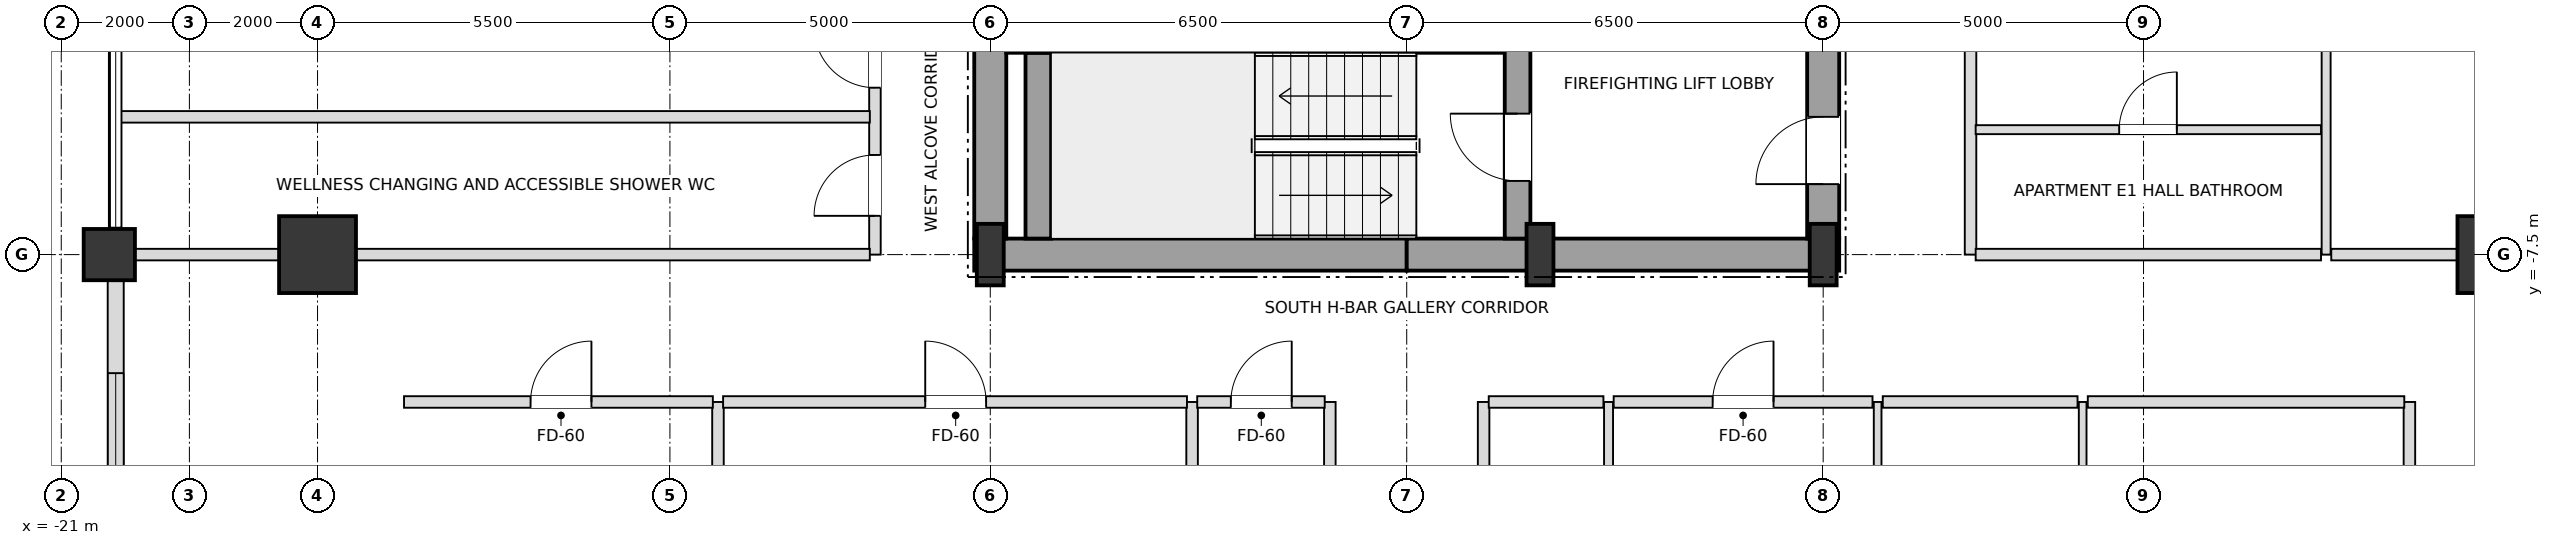
"""IFC4 building model, lengths in metres.
Left out: names, types, materials, properties, quantities, classifications, styles, units other than length and angle.
Written with IfcOpenShell. Run it as: python <this file> out.ifc"""

import sys

from ifc_helpers import new_model, si_unit, direction, frame, frame_2d, origin, origin_2d, place, context, subcontext, project, spatial, rectangle, i_section, extrude, element, fill, save


model = new_model("IFC4")
c1 = context("Model", 3, precision=1e-05, world=origin(), true_north=direction((0.0, 1.0)))
c2 = subcontext(c1, "Body", "Model", "MODEL_VIEW")
j1 = project(units=[si_unit("LENGTHUNIT", "METRE"), si_unit("PLANEANGLEUNIT", "RADIAN")], contexts=[c1])
p1 = place(None, origin())
s1 = spatial("IfcSite", under=j1, at=p1, CompositionType="ELEMENT")
p2 = place(p1, origin())
s2 = spatial("IfcBuilding", under=s1, at=p2, CompositionType="ELEMENT")
p3 = place(p2, frame((0.0, 0.0, 158.4)))
s3 = spatial("IfcBuildingStorey", under=s2, at=p3, CompositionType="ELEMENT", Elevation=158.4)
for number, where, z_axis, x_axis in (
    (1, (-6.5, -7.5, 0.0), (0.0, 0.0, 1.0), (1.0, 0.0, 0.0)),
    (2, (2.08, -7.5, 0.0), (0.0, 0.0, 1.0), (1.0, 0.0, 0.0)),
    (3, (6.5, -7.5, 0.0), (0.0, 0.0, 1.0), (1.0, 0.0, 0.0)),
):
    element("IfcColumn", number, at=place(p3, frame(where, z_axis=z_axis, x_axis=x_axis)), inside=s3, PredefinedType="COLUMN", context=c2, shape_type="SweptSolid", body=[
        extrude(i_section(OverallWidth=0.42, OverallDepth=0.96, WebThickness=0.022, FlangeThickness=0.034, at=origin_2d()), origin(), (0.0, 0.0, 1.0), 3.6),
    ])
for number, where, z_axis, x_axis in (
    (4, (17.0, -7.5, 0.0), (0.0, 0.0, 1.0), (1.0, 0.0, 0.0)),
    (5, (-17.0, -7.5, 0.0), (0.0, 0.0, 1.0), (1.0, 0.0, 0.0)),
):
    element("IfcColumn", number, at=place(p3, frame(where, z_axis=z_axis, x_axis=x_axis)), inside=s3, PredefinedType="USERDEFINED", context=c2, shape_type="SweptSolid", body=[
        extrude(rectangle(XDim=1.2, YDim=1.2, at=origin_2d()), origin(), (0.0, 0.0, 1.0), 3.6),
    ])
p4 = place(p3, frame((-20.25, -7.5, 0.0), z_axis=(0.0, 0.0, 1.0), x_axis=(1.0, 0.0, 0.0)))
e6 = element("IfcColumn", 6, at=p4, inside=s3, PredefinedType="COLUMN", context=c2, shape_type="SweptSolid", body=[
    extrude(rectangle(XDim=0.8, YDim=0.8, at=origin_2d()), origin(), (0.0, 0.0, 1.0), 3.6),
])
p5 = place(p3, frame((-20.15, -7.895, 0.0), z_axis=(0.0, 0.0, 1.0), x_axis=(0.0, -1.0, 0.0)))
e7 = element("IfcWall", 7, at=p5, inside=s3, PredefinedType="SOLIDWALL", context=c2, shape_type="SweptSolid", body=[
    extrude(rectangle(XDim=4.71, YDim=0.25, at=frame_2d((2.355, 0.0))), origin(), (0.0, 0.0, 1.0), 2.736),
])
p6 = place(p5, frame((1.455, 0.0, 0.72)))
e8 = element("IfcOpeningElement", 8, at=p6, cuts=e7, PredefinedType="OPENING", context=c2, shape_type="SweptSolid", body=[
    extrude(rectangle(XDim=1.8, YDim=1.68, at=frame_2d((0.9, 0.84))), frame((0.0, 0.135, 0.0), z_axis=(0.0, -1.0, 0.0), x_axis=(1.0, 0.0, 0.0)), (0.0, 0.0, 1.0), 0.27),
])
for number, where, z_axis, x_axis in (
    (9, (-6.75, -7.5, 0.0), (0.0, 0.0, 1.0), (1.0, 0.0, 0.0)),
    (10, (0.0, -7.5, 0.0), (0.0, 0.0, 1.0), (1.0, 0.0, 0.0)),
):
    element("IfcWall", number, at=place(p3, frame(where, z_axis=z_axis, x_axis=x_axis)), inside=s3, PredefinedType="SHEAR", context=c2, shape_type="SweptSolid", body=[
        extrude(rectangle(XDim=6.75, YDim=0.5, at=frame_2d((3.375, 0.0))), origin(), (0.0, 0.0, 1.0), 3.38),
    ])
p7 = place(p3, frame((-6.5, -7.25, 0.0), z_axis=(0.0, 0.0, 1.0), x_axis=(0.0, 1.0, 0.0)))
e11 = element("IfcWall", 11, at=p7, inside=s3, PredefinedType="SHEAR", context=c2, shape_type="SweptSolid", body=[
    extrude(rectangle(XDim=3.55, YDim=0.5, at=frame_2d((1.775, 0.0))), origin(), (0.0, 0.0, 1.0), 3.38),
])
p8 = place(p3, frame((6.5, -7.25, 0.0), z_axis=(0.0, 0.0, 1.0), x_axis=(0.0, 1.0, 0.0)))
e12 = element("IfcWall", 12, at=p8, inside=s3, PredefinedType="SHEAR", context=c2, shape_type="SweptSolid", body=[
    extrude(rectangle(XDim=5.75, YDim=0.5, at=frame_2d((2.875, 0.0))), origin(), (0.0, 0.0, 1.0), 3.38),
])
p9 = place(p8, frame((0.85, 0.0, 0.0)))
e13 = element("IfcOpeningElement", 13, at=p9, cuts=e12, PredefinedType="OPENING", context=c2, shape_type="SweptSolid", body=[
    extrude(rectangle(XDim=1.05, YDim=2.15, at=frame_2d((0.525, 1.075))), frame((0.0, 0.26, 0.0), z_axis=(0.0, -1.0, 0.0), x_axis=(1.0, 0.0, 0.0)), (0.0, 0.0, 1.0), 0.52),
])
p10 = place(p3, frame((-5.75, -7.25, 0.0), z_axis=(0.0, 0.0, 1.0), x_axis=(0.0, 1.0, 0.0)))
e14 = element("IfcWall", 14, at=p10, inside=s3, PredefinedType="SHEAR", context=c2, shape_type="SweptSolid", body=[
    extrude(rectangle(XDim=2.9, YDim=0.4, at=frame_2d((1.45, 0.0))), origin(), (0.0, 0.0, 1.0), 3.38),
])
p11 = place(p3, frame((1.73, -7.25, 0.0), z_axis=(0.0, 0.0, 1.0), x_axis=(0.0, 1.0, 0.0)))
e15 = element("IfcWall", 15, at=p11, inside=s3, PredefinedType="SHEAR", context=c2, shape_type="SweptSolid", body=[
    extrude(rectangle(XDim=3.3, YDim=0.4, at=frame_2d((1.65, 0.0))), origin(), (0.0, 0.0, 1.0), 3.38),
])
p12 = place(p11, frame((0.9, 0.0, 0.0)))
e16 = element("IfcOpeningElement", 16, at=p12, cuts=e15, PredefinedType="OPENING", context=c2, shape_type="SweptSolid", body=[
    extrude(rectangle(XDim=1.05, YDim=2.15, at=frame_2d((0.525, 1.075))), frame((0.0, 0.21, 0.0), z_axis=(0.0, -1.0, 0.0), x_axis=(1.0, 0.0, 0.0)), (0.0, 0.0, 1.0), 0.42),
])
p13 = place(p3, frame((-10.75, -23.15, 0.0), z_axis=(0.0, 0.0, 1.0), x_axis=(0.0, 1.0, 0.0)))
e17 = element("IfcWall", 17, at=p13, inside=s3, PredefinedType="PARTITIONING", context=c2, shape_type="SweptSolid", body=[
    extrude(rectangle(XDim=13.35, YDim=0.18, at=frame_2d((6.675, 0.0))), origin(), (0.0, 0.0, 1.0), 2.816),
])
p14 = place(p3, frame((-8.3, -7.5, 0.0), z_axis=(0.0, 0.0, 1.0), x_axis=(0.0, 1.0, 0.0)))
e18 = element("IfcWall", 18, at=p14, inside=s3, PredefinedType="PARTITIONING", context=c2, shape_type="SweptSolid", body=[
    extrude(rectangle(XDim=15.0, YDim=0.18, at=frame_2d((7.5, 0.0))), origin(), (0.0, 0.0, 1.0), 3.38),
])
p15 = place(p14, frame((0.605, 0.0, 0.0)))
e19 = element("IfcOpeningElement", 19, at=p15, cuts=e18, PredefinedType="OPENING", context=c2, shape_type="SweptSolid", body=[
    extrude(rectangle(XDim=0.95, YDim=2.15, at=frame_2d((0.475, 1.075))), frame((0.0, 0.1, 0.0), z_axis=(0.0, -1.0, 0.0), x_axis=(1.0, 0.0, 0.0)), (0.0, 0.0, 1.0), 0.2),
])
p16 = place(p14, frame((2.605, 0.0, 0.0)))
e20 = element("IfcOpeningElement", 20, at=p16, cuts=e18, PredefinedType="OPENING", context=c2, shape_type="SweptSolid", body=[
    extrude(rectangle(XDim=0.95, YDim=2.15, at=frame_2d((0.475, 1.075))), frame((0.0, 0.1, 0.0), z_axis=(0.0, -1.0, 0.0), x_axis=(1.0, 0.0, 0.0)), (0.0, 0.0, 1.0), 0.2),
])
for number, where, z_axis, x_axis in (
    (21, (-3.35, -23.15, 0.0), (0.0, 0.0, 1.0), (0.0, 1.0, 0.0)),
    (22, (-1.2, -23.15, 0.0), (0.0, 0.0, 1.0), (0.0, 1.0, 0.0)),
    (23, (1.2, -23.15, 0.0), (0.0, 0.0, 1.0), (0.0, 1.0, 0.0)),
):
    element("IfcWall", number, at=place(p3, frame(where, z_axis=z_axis, x_axis=x_axis)), inside=s3, PredefinedType="PARTITIONING", context=c2, shape_type="SweptSolid", body=[
        extrude(rectangle(XDim=13.35, YDim=0.18, at=frame_2d((6.675, 0.0))), origin(), (0.0, 0.0, 1.0), 2.816),
    ])
p17 = place(p3, frame((3.15, -17.15, 0.0), z_axis=(0.0, 0.0, 1.0), x_axis=(0.0, 1.0, 0.0)))
e24 = element("IfcWall", 24, at=p17, inside=s3, PredefinedType="PARTITIONING", context=c2, shape_type="SweptSolid", body=[
    extrude(rectangle(XDim=7.35, YDim=0.14, at=frame_2d((3.675, 0.0))), origin(), (0.0, 0.0, 1.0), 3.38),
])
p18 = place(p17, frame((3.23, 0.0, 0.0)))
e25 = element("IfcOpeningElement", 25, at=p18, cuts=e24, PredefinedType="OPENING", context=c2, shape_type="SweptSolid", body=[
    extrude(rectangle(XDim=0.9, YDim=2.1, at=frame_2d((0.45, 1.05))), frame((0.0, 0.08, 0.0), z_axis=(0.0, -1.0, 0.0), x_axis=(1.0, 0.0, 0.0)), (0.0, 0.0, 1.0), 0.16),
])
p19 = place(p3, frame((7.35, -23.15, 0.0), z_axis=(0.0, 0.0, 1.0), x_axis=(0.0, 1.0, 0.0)))
e26 = element("IfcWall", 26, at=p19, inside=s3, PredefinedType="PARTITIONING", context=c2, shape_type="SweptSolid", body=[
    extrude(rectangle(XDim=13.35, YDim=0.12, at=frame_2d((6.675, 0.0))), origin(), (0.0, 0.0, 1.0), 2.816),
])
p20 = place(p19, frame((9.205, 0.0, 0.0)))
e27 = element("IfcOpeningElement", 27, at=p20, cuts=e26, PredefinedType="OPENING", context=c2, shape_type="SweptSolid", body=[
    extrude(rectangle(XDim=0.95, YDim=2.1, at=frame_2d((0.475, 1.05))), frame((0.0, 0.07, 0.0), z_axis=(0.0, -1.0, 0.0), x_axis=(1.0, 0.0, 0.0)), (0.0, 0.0, 1.0), 0.14),
])
p21 = place(p19, frame((1.399, 0.0, 0.0)))
e28 = element("IfcOpeningElement", 28, at=p21, cuts=e26, PredefinedType="OPENING", context=c2, shape_type="SweptSolid", body=[
    extrude(rectangle(XDim=0.9, YDim=2.1, at=frame_2d((0.45, 1.05))), frame((0.0, 0.07, 0.0), z_axis=(0.0, -1.0, 0.0), x_axis=(1.0, 0.0, 0.0)), (0.0, 0.0, 1.0), 0.14),
])
p22 = place(p3, frame((8.8, -7.5, 0.0), z_axis=(0.0, 0.0, 1.0), x_axis=(0.0, 1.0, 0.0)))
e29 = element("IfcWall", 29, at=p22, inside=s3, PredefinedType="PARTITIONING", context=c2, shape_type="SweptSolid", body=[
    extrude(rectangle(XDim=15.0, YDim=0.18, at=frame_2d((7.5, 0.0))), origin(), (0.0, 0.0, 1.0), 3.38),
])
p23 = place(p22, frame((3.475, 0.0, 0.0)))
e30 = element("IfcOpeningElement", 30, at=p23, cuts=e29, PredefinedType="OPENING", context=c2, shape_type="SweptSolid", body=[
    extrude(rectangle(XDim=0.95, YDim=2.15, at=frame_2d((0.475, 1.075))), frame((0.0, 0.1, 0.0), z_axis=(0.0, -1.0, 0.0), x_axis=(1.0, 0.0, 0.0)), (0.0, 0.0, 1.0), 0.2),
])
p24 = place(p3, frame((10.55, -23.15, 0.0), z_axis=(0.0, 0.0, 1.0), x_axis=(0.0, 1.0, 0.0)))
e31 = element("IfcWall", 31, at=p24, inside=s3, PredefinedType="PARTITIONING", context=c2, shape_type="SweptSolid", body=[
    extrude(rectangle(XDim=13.35, YDim=0.12, at=frame_2d((6.675, 0.0))), origin(), (0.0, 0.0, 1.0), 2.816),
])
p25 = place(p24, frame((8.687, 0.0, 0.0)))
e32 = element("IfcOpeningElement", 32, at=p25, cuts=e31, PredefinedType="OPENING", context=c2, shape_type="SweptSolid", body=[
    extrude(rectangle(XDim=0.95, YDim=2.1, at=frame_2d((0.475, 1.05))), frame((0.0, 0.07, 0.0), z_axis=(0.0, -1.0, 0.0), x_axis=(1.0, 0.0, 0.0)), (0.0, 0.0, 1.0), 0.14),
])
p26 = place(p24, frame((1.399, 0.0, 0.0)))
e33 = element("IfcOpeningElement", 33, at=p26, cuts=e31, PredefinedType="OPENING", context=c2, shape_type="SweptSolid", body=[
    extrude(rectangle(XDim=0.9, YDim=2.1, at=frame_2d((0.45, 1.05))), frame((0.0, 0.07, 0.0), z_axis=(0.0, -1.0, 0.0), x_axis=(1.0, 0.0, 0.0)), (0.0, 0.0, 1.0), 0.14),
])
p27 = place(p3, frame((14.35, -7.5, 0.0), z_axis=(0.0, 0.0, 1.0), x_axis=(0.0, 1.0, 0.0)))
e34 = element("IfcWall", 34, at=p27, inside=s3, PredefinedType="PARTITIONING", context=c2, shape_type="SweptSolid", body=[
    extrude(rectangle(XDim=15.0, YDim=0.14, at=frame_2d((7.5, 0.0))), origin(), (0.0, 0.0, 1.0), 3.38),
])
p28 = place(p27, frame((3.475, 0.0, 0.0)))
e35 = element("IfcOpeningElement", 35, at=p28, cuts=e34, PredefinedType="OPENING", context=c2, shape_type="SweptSolid", body=[
    extrude(rectangle(XDim=0.95, YDim=2.1, at=frame_2d((0.475, 1.05))), frame((0.0, 0.08, 0.0), z_axis=(0.0, -1.0, 0.0), x_axis=(1.0, 0.0, 0.0)), (0.0, 0.0, 1.0), 0.16),
])
p29 = place(p3, frame((15.65, -17.15, 0.0), z_axis=(0.0, 0.0, 1.0), x_axis=(0.0, 1.0, 0.0)))
e36 = element("IfcWall", 36, at=p29, inside=s3, PredefinedType="PARTITIONING", context=c2, shape_type="SweptSolid", body=[
    extrude(rectangle(XDim=7.35, YDim=0.18, at=frame_2d((3.675, 0.0))), origin(), (0.0, 0.0, 1.0), 2.736),
])
p30 = place(p3, frame((-15.65, -9.8, 0.0), z_axis=(0.0, 0.0, 1.0), x_axis=(1.0, 0.0, 0.0)))
e37 = element("IfcWall", 37, at=p30, inside=s3, PredefinedType="PARTITIONING", context=c2, shape_type="SweptSolid", body=[
    extrude(rectangle(XDim=4.82, YDim=0.18, at=frame_2d((2.41, 0.0))), origin(), (0.0, 0.0, 1.0), 3.38),
])
p31 = place(p30, frame((1.975, 0.0, 0.0)))
e38 = element("IfcOpeningElement", 38, at=p31, cuts=e37, PredefinedType="OPENING", context=c2, shape_type="SweptSolid", body=[
    extrude(rectangle(XDim=0.95, YDim=2.15, at=frame_2d((0.475, 1.075))), frame((0.0, 0.1, 0.0), z_axis=(0.0, -1.0, 0.0), x_axis=(1.0, 0.0, 0.0)), (0.0, 0.0, 1.0), 0.2),
])
p32 = place(p3, frame((-10.67, -9.8, 0.0), z_axis=(0.0, 0.0, 1.0), x_axis=(1.0, 0.0, 0.0)))
e39 = element("IfcWall", 39, at=p32, inside=s3, PredefinedType="PARTITIONING", context=c2, shape_type="SweptSolid", body=[
    extrude(rectangle(XDim=7.24, YDim=0.18, at=frame_2d((3.62, 0.0))), origin(), (0.0, 0.0, 1.0), 2.816),
])
p33 = place(p32, frame((3.155, 0.0, 0.0)))
e40 = element("IfcOpeningElement", 40, at=p33, cuts=e39, PredefinedType="OPENING", context=c2, shape_type="SweptSolid", body=[
    extrude(rectangle(XDim=0.95, YDim=2.15, at=frame_2d((0.475, 1.075))), frame((0.0, 0.1, 0.0), z_axis=(0.0, -1.0, 0.0), x_axis=(1.0, 0.0, 0.0)), (0.0, 0.0, 1.0), 0.2),
])
p34 = place(p3, frame((-3.27, -9.8, 0.0), z_axis=(0.0, 0.0, 1.0), x_axis=(1.0, 0.0, 0.0)))
e41 = element("IfcWall", 41, at=p34, inside=s3, PredefinedType="PARTITIONING", context=c2, shape_type="SweptSolid", body=[
    extrude(rectangle(XDim=1.99, YDim=0.18, at=frame_2d((0.995, 0.0))), origin(), (0.0, 0.0, 1.0), 3.38),
])
p35 = place(p34, frame((0.525, 0.0, 0.0)))
e42 = element("IfcOpeningElement", 42, at=p35, cuts=e41, PredefinedType="OPENING", context=c2, shape_type="SweptSolid", body=[
    extrude(rectangle(XDim=0.95, YDim=2.15, at=frame_2d((0.475, 1.075))), frame((0.0, 0.1, 0.0), z_axis=(0.0, -1.0, 0.0), x_axis=(1.0, 0.0, 0.0)), (0.0, 0.0, 1.0), 0.2),
])
p36 = place(p3, frame((1.28, -9.8, 0.0), z_axis=(0.0, 0.0, 1.0), x_axis=(1.0, 0.0, 0.0)))
e43 = element("IfcWall", 43, at=p36, inside=s3, PredefinedType="PARTITIONING", context=c2, shape_type="SweptSolid", body=[
    extrude(rectangle(XDim=1.79, YDim=0.18, at=frame_2d((0.895, 0.0))), origin(), (0.0, 0.0, 1.0), 3.38),
])
p37 = place(p3, frame((3.23, -9.8, 0.0), z_axis=(0.0, 0.0, 1.0), x_axis=(1.0, 0.0, 0.0)))
e44 = element("IfcWall", 44, at=p37, inside=s3, PredefinedType="PARTITIONING", context=c2, shape_type="SweptSolid", body=[
    extrude(rectangle(XDim=4.04, YDim=0.18, at=frame_2d((2.02, 0.0))), origin(), (0.0, 0.0, 1.0), 2.816),
])
p38 = place(p37, frame((1.545, 0.0, 0.0)))
e45 = element("IfcOpeningElement", 45, at=p38, cuts=e44, PredefinedType="OPENING", context=c2, shape_type="SweptSolid", body=[
    extrude(rectangle(XDim=0.95, YDim=2.15, at=frame_2d((0.475, 1.075))), frame((0.0, 0.1, 0.0), z_axis=(0.0, -1.0, 0.0), x_axis=(1.0, 0.0, 0.0)), (0.0, 0.0, 1.0), 0.2),
])
p39 = place(p3, frame((7.43, -9.8, 0.0), z_axis=(0.0, 0.0, 1.0), x_axis=(1.0, 0.0, 0.0)))
e46 = element("IfcWall", 46, at=p39, inside=s3, PredefinedType="PARTITIONING", context=c2, shape_type="SweptSolid", body=[
    extrude(rectangle(XDim=3.04, YDim=0.18, at=frame_2d((1.52, 0.0))), origin(), (0.0, 0.0, 1.0), 3.38),
])
p40 = place(p3, frame((10.63, -9.8, 0.0), z_axis=(0.0, 0.0, 1.0), x_axis=(1.0, 0.0, 0.0)))
e47 = element("IfcWall", 47, at=p40, inside=s3, PredefinedType="PARTITIONING", context=c2, shape_type="SweptSolid", body=[
    extrude(rectangle(XDim=4.94, YDim=0.18, at=frame_2d((2.47, 0.0))), origin(), (0.0, 0.0, 1.0), 3.38),
])
p41 = place(p3, frame((-20.15, -7.5, 0.0), z_axis=(0.0, 0.0, 1.0), x_axis=(1.0, 0.0, 0.0)))
e48 = element("IfcWall", 48, at=p41, inside=s3, PredefinedType="PARTITIONING", context=c2, shape_type="SweptSolid", body=[
    extrude(rectangle(XDim=11.77, YDim=0.18, at=frame_2d((5.885, 0.0))), origin(), (0.0, 0.0, 1.0), 2.816),
])
p42 = place(p3, frame((8.88, -7.5, 0.0), z_axis=(0.0, 0.0, 1.0), x_axis=(1.0, 0.0, 0.0)))
e49 = element("IfcWall", 49, at=p42, inside=s3, PredefinedType="PARTITIONING", context=c2, shape_type="SweptSolid", body=[
    extrude(rectangle(XDim=5.39, YDim=0.18, at=frame_2d((2.695, 0.0))), origin(), (0.0, 0.0, 1.0), 2.816),
])
p43 = place(p3, frame((14.43, -7.5, 0.0), z_axis=(0.0, 0.0, 1.0), x_axis=(1.0, 0.0, 0.0)))
e50 = element("IfcWall", 50, at=p43, inside=s3, PredefinedType="PARTITIONING", context=c2, shape_type="SweptSolid", body=[
    extrude(rectangle(XDim=5.72, YDim=0.18, at=frame_2d((2.86, 0.0))), origin(), (0.0, 0.0, 1.0), 2.816),
])
p44 = place(p3, frame((8.88, -5.55, 0.0), z_axis=(0.0, 0.0, 1.0), x_axis=(1.0, 0.0, 0.0)))
e51 = element("IfcWall", 51, at=p44, inside=s3, PredefinedType="PARTITIONING", context=c2, shape_type="SweptSolid", body=[
    extrude(rectangle(XDim=5.39, YDim=0.14, at=frame_2d((2.695, 0.0))), origin(), (0.0, 0.0, 1.0), 3.38),
])
p45 = place(p44, frame((2.24, 0.0, 0.0)))
e52 = element("IfcOpeningElement", 52, at=p45, cuts=e51, PredefinedType="OPENING", context=c2, shape_type="SweptSolid", body=[
    extrude(rectangle(XDim=0.9, YDim=2.1, at=frame_2d((0.45, 1.05))), frame((0.0, 0.08, 0.0), z_axis=(0.0, -1.0, 0.0), x_axis=(1.0, 0.0, 0.0)), (0.0, 0.0, 1.0), 0.16),
])
p46 = place(p3, frame((-20.07, -5.35, 0.0), z_axis=(0.0, 0.0, 1.0), x_axis=(1.0, 0.0, 0.0)))
e53 = element("IfcWall", 53, at=p46, inside=s3, PredefinedType="PARTITIONING", context=c2, shape_type="SweptSolid", body=[
    extrude(rectangle(XDim=11.69, YDim=0.18, at=frame_2d((5.845, 0.0))), origin(), (0.0, 0.0, 1.0), 2.816),
])
p47 = place(p6, origin())
e54 = element("IfcWindow", 54, at=p47, inside=s3, PartitioningType="SINGLE_PANEL", PredefinedType="WINDOW", context=c2, shape_type="SweptSolid", body=[
    extrude(rectangle(XDim=1.8, YDim=1.68, at=frame_2d((0.9, 0.84))), frame((0.0, 0.03, 0.0), z_axis=(0.0, -1.0, 0.0), x_axis=(1.0, 0.0, 0.0)), (0.0, 0.0, 1.0), 0.06),
])
fill(e8, e54)
p48 = place(p9, origin())
e55 = element("IfcDoor", 55, at=p48, inside=s3, OperationType="SINGLE_SWING_LEFT", PredefinedType="DOOR", context=c2, shape_type="SweptSolid", body=[
    extrude(rectangle(XDim=1.05, YDim=2.15, at=frame_2d((0.525, 1.075))), frame((0.0, 0.025, 0.0), z_axis=(0.0, -1.0, 0.0), x_axis=(1.0, 0.0, 0.0)), (0.0, 0.0, 1.0), 0.05),
])
fill(e13, e55)
p49 = place(p12, origin())
e56 = element("IfcDoor", 56, at=p49, inside=s3, OperationType="SINGLE_SWING_RIGHT", PredefinedType="DOOR", context=c2, shape_type="SweptSolid", body=[
    extrude(rectangle(XDim=1.05, YDim=2.15, at=frame_2d((0.525, 1.075))), frame((0.0, 0.025, 0.0), z_axis=(0.0, -1.0, 0.0), x_axis=(1.0, 0.0, 0.0)), (0.0, 0.0, 1.0), 0.05),
])
fill(e16, e56)
p50 = place(p31, origin())
e57 = element("IfcDoor", 57, at=p50, inside=s3, OperationType="SINGLE_SWING_RIGHT", PredefinedType="DOOR", context=c2, shape_type="SweptSolid", body=[
    extrude(rectangle(XDim=0.95, YDim=2.15, at=frame_2d((0.475, 1.075))), frame((0.0, 0.025, 0.0), z_axis=(0.0, -1.0, 0.0), x_axis=(1.0, 0.0, 0.0)), (0.0, 0.0, 1.0), 0.05),
])
fill(e38, e57)
p51 = place(p33, origin())
e58 = element("IfcDoor", 58, at=p51, inside=s3, OperationType="SINGLE_SWING_LEFT", PredefinedType="DOOR", context=c2, shape_type="SweptSolid", body=[
    extrude(rectangle(XDim=0.95, YDim=2.15, at=frame_2d((0.475, 1.075))), frame((0.0, 0.025, 0.0), z_axis=(0.0, -1.0, 0.0), x_axis=(1.0, 0.0, 0.0)), (0.0, 0.0, 1.0), 0.05),
])
fill(e40, e58)
p52 = place(p35, origin())
e59 = element("IfcDoor", 59, at=p52, inside=s3, OperationType="SINGLE_SWING_RIGHT", PredefinedType="DOOR", context=c2, shape_type="SweptSolid", body=[
    extrude(rectangle(XDim=0.95, YDim=2.15, at=frame_2d((0.475, 1.075))), frame((0.0, 0.025, 0.0), z_axis=(0.0, -1.0, 0.0), x_axis=(1.0, 0.0, 0.0)), (0.0, 0.0, 1.0), 0.05),
])
fill(e42, e59)
p53 = place(p38, origin())
e60 = element("IfcDoor", 60, at=p53, inside=s3, OperationType="SINGLE_SWING_RIGHT", PredefinedType="DOOR", context=c2, shape_type="SweptSolid", body=[
    extrude(rectangle(XDim=0.95, YDim=2.15, at=frame_2d((0.475, 1.075))), frame((0.0, 0.025, 0.0), z_axis=(0.0, -1.0, 0.0), x_axis=(1.0, 0.0, 0.0)), (0.0, 0.0, 1.0), 0.05),
])
fill(e45, e60)
p54 = place(p15, origin())
e61 = element("IfcDoor", 61, at=p54, inside=s3, OperationType="SINGLE_SWING_LEFT", PredefinedType="DOOR", context=c2, shape_type="SweptSolid", body=[
    extrude(rectangle(XDim=0.95, YDim=2.15, at=frame_2d((0.475, 1.075))), frame((0.0, 0.025, 0.0), z_axis=(0.0, -1.0, 0.0), x_axis=(1.0, 0.0, 0.0)), (0.0, 0.0, 1.0), 0.05),
])
fill(e19, e61)
p55 = place(p16, origin())
e62 = element("IfcDoor", 62, at=p55, inside=s3, OperationType="SINGLE_SWING_RIGHT", PredefinedType="DOOR", context=c2, shape_type="SweptSolid", body=[
    extrude(rectangle(XDim=0.95, YDim=2.15, at=frame_2d((0.475, 1.075))), frame((0.0, 0.025, 0.0), z_axis=(0.0, -1.0, 0.0), x_axis=(1.0, 0.0, 0.0)), (0.0, 0.0, 1.0), 0.05),
])
fill(e20, e62)
p56 = place(p45, origin())
e63 = element("IfcDoor", 63, at=p56, inside=s3, OperationType="SINGLE_SWING_RIGHT", PredefinedType="DOOR", context=c2, shape_type="SweptSolid", body=[
    extrude(rectangle(XDim=0.9, YDim=2.1, at=frame_2d((0.45, 1.05))), frame((0.0, 0.025, 0.0), z_axis=(0.0, -1.0, 0.0), x_axis=(1.0, 0.0, 0.0)), (0.0, 0.0, 1.0), 0.05),
])
fill(e52, e63)
save(model, sys.argv[1])
